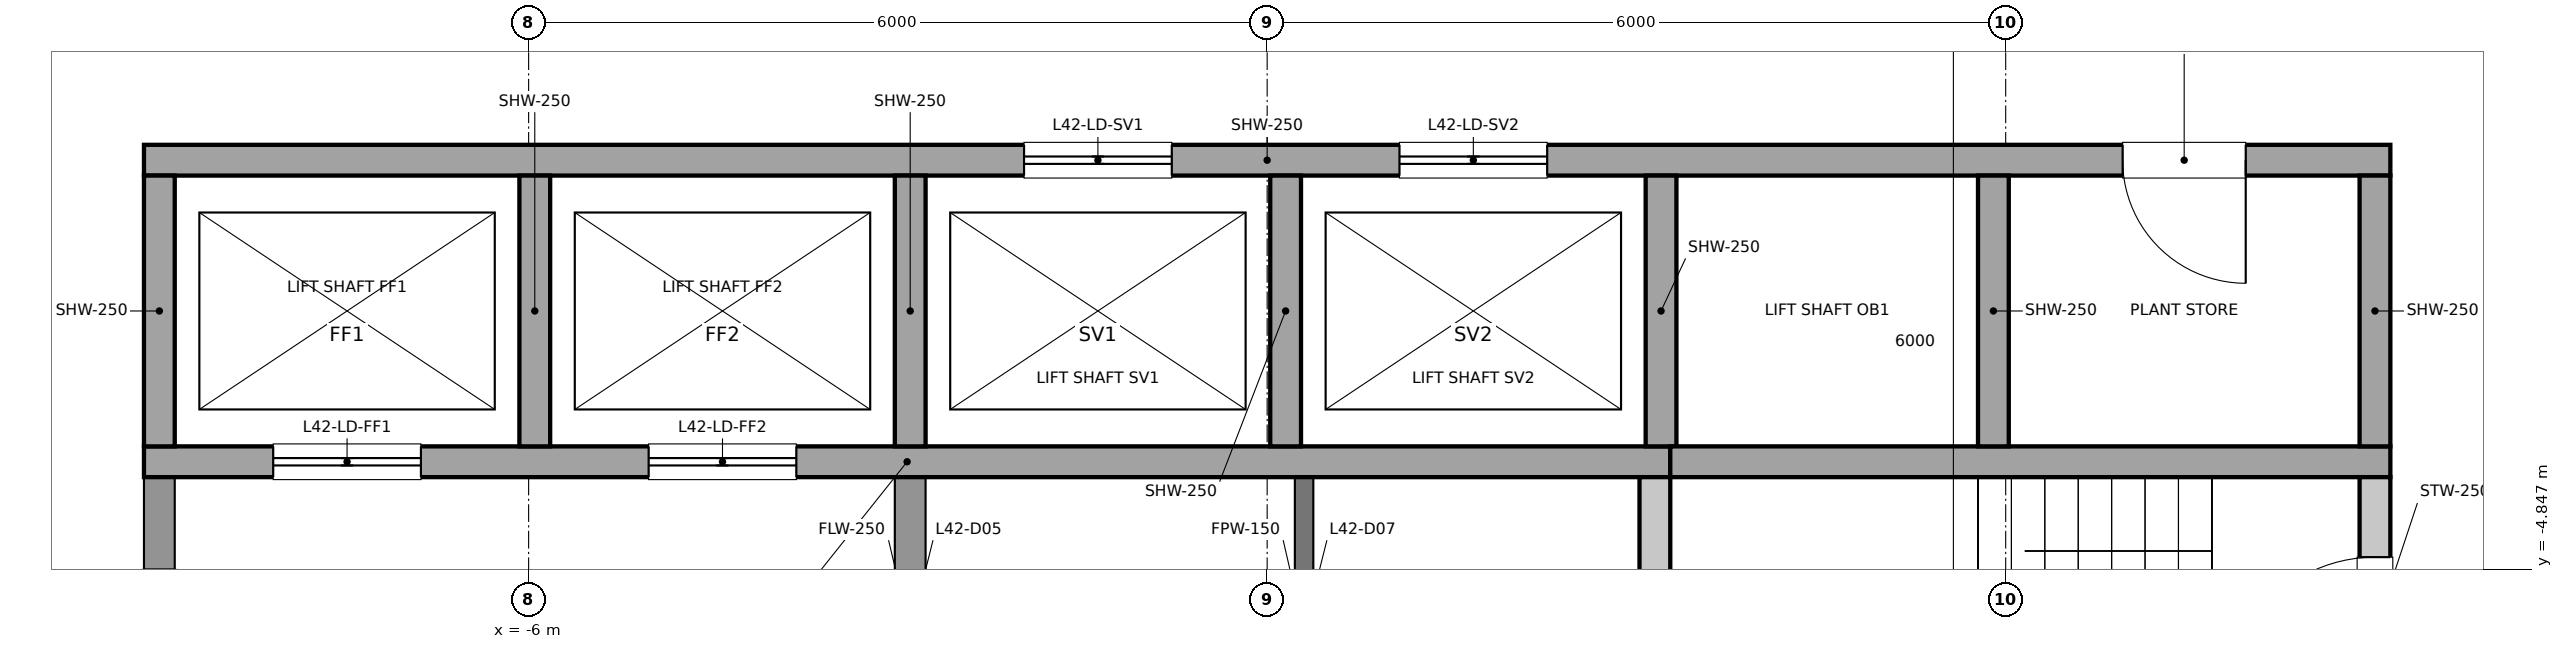
"""IFC4 building model, lengths in metres.
Left out: names, types, materials, properties, quantities, classifications, styles, units other than length and angle.
Written with IfcOpenShell. Run it as: python <this file> out.ifc"""

import sys

from ifc_helpers import new_model, si_unit, direction, frame, frame_2d, origin, place, context, subcontext, project, spatial, rectangle, extrude, element, fill, save


model = new_model("IFC4")
c1 = context("Model", 3, precision=1e-05, world=origin(), true_north=direction((0.0, 1.0)))
c2 = subcontext(c1, "Body", "Model", "MODEL_VIEW")
j1 = project(units=[si_unit("LENGTHUNIT", "METRE"), si_unit("PLANEANGLEUNIT", "RADIAN")], contexts=[c1])
p1 = place(None, origin())
s1 = spatial("IfcSite", under=j1, at=p1, CompositionType="ELEMENT")
p2 = place(p1, origin())
s2 = spatial("IfcBuilding", under=s1, at=p2, CompositionType="ELEMENT")
p3 = place(p2, frame((0.0, 0.0, 197.6)))
s3 = spatial("IfcBuildingStorey", under=s2, at=p3, CompositionType="ELEMENT", Elevation=197.6)
p4 = place(p3, frame((0.3, -6.6, 0.0), z_axis=(0.0, 0.0, 1.0), x_axis=(0.0, 1.0, 0.0)))
e1 = element("IfcWall", 1, at=p4, inside=s3, PredefinedType="PARTITIONING", context=c2, shape_type="SweptSolid", body=[
    extrude(rectangle(XDim=2.5, YDim=0.15, at=frame_2d((1.25, 0.0))), origin(), (0.0, 0.0, 1.0), 5.2),
])
p5 = place(p4, frame((0.8, 0.0, 0.0)))
e2 = element("IfcOpeningElement", 2, at=p5, cuts=e1, PredefinedType="OPENING", context=c2, shape_type="SweptSolid", body=[
    extrude(rectangle(XDim=0.9, YDim=2.1, at=frame_2d((0.45, 1.05))), frame((0.0, 0.075, 0.0), z_axis=(0.0, -1.0, 0.0), x_axis=(1.0, 0.0, 0.0)), (0.0, 0.0, 1.0), 0.15),
])
p6 = place(p3, frame((9.0, -6.6, 0.0), z_axis=(0.0, 0.0, 1.0), x_axis=(0.0, 1.0, 0.0)))
e3 = element("IfcWall", 3, at=p6, inside=s3, PredefinedType="SOLIDWALL", context=c2, shape_type="SweptSolid", body=[
    extrude(rectangle(XDim=2.5, YDim=0.25, at=frame_2d((1.25, 0.0))), origin(), (0.0, 0.0, 1.0), 5.2),
])
p7 = place(p6, frame((0.65, 0.0, 0.0)))
e4 = element("IfcOpeningElement", 4, at=p7, cuts=e3, PredefinedType="OPENING", context=c2, shape_type="SweptSolid", body=[
    extrude(rectangle(XDim=1.2, YDim=2.1, at=frame_2d((0.6, 1.05))), frame((0.0, 0.125, 0.0), z_axis=(0.0, -1.0, 0.0), x_axis=(1.0, 0.0, 0.0)), (0.0, 0.0, 1.0), 0.25),
])
p8 = place(p3, frame((-9.0, -6.6, 0.0), z_axis=(0.0, 0.0, 1.0), x_axis=(0.0, 1.0, 0.0)))
e5 = element("IfcWall", 5, at=p8, inside=s3, PredefinedType="PARTITIONING", context=c2, shape_type="SweptSolid", body=[
    extrude(rectangle(XDim=2.5, YDim=0.25, at=frame_2d((1.25, 0.0))), origin(), (0.0, 0.0, 1.0), 5.2),
])
p9 = place(p8, frame((0.75, 0.0, 0.0)))
e6 = element("IfcOpeningElement", 6, at=p9, cuts=e5, PredefinedType="OPENING", context=c2, shape_type="SweptSolid", body=[
    extrude(rectangle(XDim=1.0, YDim=2.1, at=frame_2d((0.5, 1.05))), frame((0.0, 0.125, 0.0), z_axis=(0.0, -1.0, 0.0), x_axis=(1.0, 0.0, 0.0)), (0.0, 0.0, 1.0), 0.25),
])
p10 = place(p3, frame((3.15, -6.6, 0.0), z_axis=(0.0, 0.0, 1.0), x_axis=(0.0, 1.0, 0.0)))
e7 = element("IfcWall", 7, at=p10, inside=s3, PredefinedType="SOLIDWALL", context=c2, shape_type="SweptSolid", body=[
    extrude(rectangle(XDim=2.5, YDim=0.25, at=frame_2d((1.25, 0.0))), origin(), (0.0, 0.0, 1.0), 5.2),
])
p11 = place(p3, frame((-2.9, -6.6, 0.0), z_axis=(0.0, 0.0, 1.0), x_axis=(0.0, 1.0, 0.0)))
e8 = element("IfcWall", 8, at=p11, inside=s3, PredefinedType="PARTITIONING", context=c2, shape_type="SweptSolid", body=[
    extrude(rectangle(XDim=2.5, YDim=0.25, at=frame_2d((1.25, 0.0))), origin(), (0.0, 0.0, 1.0), 5.2),
])
p12 = place(p11, frame((0.8, 0.0, 0.0)))
e9 = element("IfcOpeningElement", 9, at=p12, cuts=e8, PredefinedType="OPENING", context=c2, shape_type="SweptSolid", body=[
    extrude(rectangle(XDim=0.9, YDim=2.1, at=frame_2d((0.45, 1.05))), frame((0.0, 0.125, 0.0), z_axis=(0.0, -1.0, 0.0), x_axis=(1.0, 0.0, 0.0)), (0.0, 0.0, 1.0), 0.25),
])
p13 = place(p3, frame((-9.125, -1.525, 0.0), z_axis=(0.0, 0.0, 1.0), x_axis=(1.0, 0.0, 0.0)))
e10 = element("IfcWall", 10, at=p13, inside=s3, PredefinedType="SOLIDWALL", context=c2, shape_type="SweptSolid", body=[
    extrude(rectangle(XDim=18.25, YDim=0.25, at=frame_2d((9.125, 0.0))), origin(), (0.0, 0.0, 1.0), 5.2),
])
p14 = place(p13, frame((7.15, 0.0, 0.0)))
e11 = element("IfcOpeningElement", 11, at=p14, cuts=e10, PredefinedType="OPENING", context=c2, shape_type="SweptSolid", body=[
    extrude(rectangle(XDim=1.2, YDim=2.1, at=frame_2d((0.6, 1.05))), frame((0.0, 0.125, 0.0), z_axis=(0.0, -1.0, 0.0), x_axis=(1.0, 0.0, 0.0)), (0.0, 0.0, 1.0), 0.25),
])
p15 = place(p13, frame((10.2, 0.0, 0.0)))
e12 = element("IfcOpeningElement", 12, at=p15, cuts=e10, PredefinedType="OPENING", context=c2, shape_type="SweptSolid", body=[
    extrude(rectangle(XDim=1.2, YDim=2.1, at=frame_2d((0.6, 1.05))), frame((0.0, 0.125, 0.0), z_axis=(0.0, -1.0, 0.0), x_axis=(1.0, 0.0, 0.0)), (0.0, 0.0, 1.0), 0.25),
])
p16 = place(p13, frame((16.075, 0.0, 0.0)))
e13 = element("IfcOpeningElement", 13, at=p16, cuts=e10, PredefinedType="OPENING", context=c2, shape_type="SweptSolid", body=[
    extrude(rectangle(XDim=1.0, YDim=2.1, at=frame_2d((0.5, 1.05))), frame((0.0, 0.125, 0.0), z_axis=(0.0, -1.0, 0.0), x_axis=(1.0, 0.0, 0.0)), (0.0, 0.0, 1.0), 0.25),
])
p17 = place(p3, frame((-9.125, -3.975, 0.0), z_axis=(0.0, 0.0, 1.0), x_axis=(1.0, 0.0, 0.0)))
e14 = element("IfcWall", 14, at=p17, inside=s3, PredefinedType="SOLIDWALL", context=c2, shape_type="SweptSolid", body=[
    extrude(rectangle(XDim=12.4, YDim=0.25, at=frame_2d((6.2, 0.0))), origin(), (0.0, 0.0, 1.0), 5.2),
])
p18 = place(p17, frame((1.05, 0.0, 0.0)))
e15 = element("IfcOpeningElement", 15, at=p18, cuts=e14, PredefinedType="OPENING", context=c2, shape_type="SweptSolid", body=[
    extrude(rectangle(XDim=1.2, YDim=2.1, at=frame_2d((0.6, 1.05))), frame((0.0, 0.125, 0.0), z_axis=(0.0, -1.0, 0.0), x_axis=(1.0, 0.0, 0.0)), (0.0, 0.0, 1.0), 0.25),
])
p19 = place(p17, frame((4.1, 0.0, 0.0)))
e16 = element("IfcOpeningElement", 16, at=p19, cuts=e14, PredefinedType="OPENING", context=c2, shape_type="SweptSolid", body=[
    extrude(rectangle(XDim=1.2, YDim=2.1, at=frame_2d((0.6, 1.05))), frame((0.0, 0.125, 0.0), z_axis=(0.0, -1.0, 0.0), x_axis=(1.0, 0.0, 0.0)), (0.0, 0.0, 1.0), 0.25),
])
p20 = place(p3, frame((3.275, -3.975, 0.0), z_axis=(0.0, 0.0, 1.0), x_axis=(1.0, 0.0, 0.0)))
e17 = element("IfcWall", 17, at=p20, inside=s3, PredefinedType="SOLIDWALL", context=c2, shape_type="SweptSolid", body=[
    extrude(rectangle(XDim=5.85, YDim=0.25, at=frame_2d((2.925, 0.0))), origin(), (0.0, 0.0, 1.0), 5.2),
])
for number, where, z_axis, x_axis in (
    (18, (-9.0, -3.85, 0.0), (0.0, 0.0, 1.0), (0.0, 1.0, 0.0)),
    (19, (-5.95, -3.85, 0.0), (0.0, 0.0, 1.0), (0.0, 1.0, 0.0)),
    (20, (-2.9, -3.85, 0.0), (0.0, 0.0, 1.0), (0.0, 1.0, 0.0)),
    (21, (0.15, -3.85, 0.0), (0.0, 0.0, 1.0), (0.0, 1.0, 0.0)),
    (22, (3.2, -3.85, 0.0), (0.0, 0.0, 1.0), (0.0, 1.0, 0.0)),
    (23, (5.9, -3.85, 0.0), (0.0, 0.0, 1.0), (0.0, 1.0, 0.0)),
    (24, (9.0, -3.85, 0.0), (0.0, 0.0, 1.0), (0.0, 1.0, 0.0)),
):
    element("IfcWall", number, at=place(p3, frame(where, z_axis=z_axis, x_axis=x_axis)), inside=s3, PredefinedType="SOLIDWALL", context=c2, shape_type="SweptSolid", body=[
        extrude(rectangle(XDim=2.2, YDim=0.25, at=frame_2d((1.1, 0.0))), origin(), (0.0, 0.0, 1.0), 5.2),
    ])
p21 = place(p18, origin())
e25 = element("IfcDoor", 25, at=p21, inside=s3, OperationType="DOUBLE_DOOR_SLIDING", PredefinedType="DOOR", context=c2, shape_type="SweptSolid", body=[
    extrude(rectangle(XDim=1.2, YDim=2.1, at=frame_2d((0.6, 1.05))), frame((0.0, 0.025, 0.0), z_axis=(0.0, -1.0, 0.0), x_axis=(1.0, 0.0, 0.0)), (0.0, 0.0, 1.0), 0.05),
])
fill(e15, e25)
p22 = place(p19, origin())
e26 = element("IfcDoor", 26, at=p22, inside=s3, OperationType="DOUBLE_DOOR_SLIDING", PredefinedType="DOOR", context=c2, shape_type="SweptSolid", body=[
    extrude(rectangle(XDim=1.2, YDim=2.1, at=frame_2d((0.6, 1.05))), frame((0.0, 0.025, 0.0), z_axis=(0.0, -1.0, 0.0), x_axis=(1.0, 0.0, 0.0)), (0.0, 0.0, 1.0), 0.05),
])
fill(e16, e26)
p23 = place(p14, origin())
e27 = element("IfcDoor", 27, at=p23, inside=s3, OperationType="DOUBLE_DOOR_SLIDING", PredefinedType="DOOR", context=c2, shape_type="SweptSolid", body=[
    extrude(rectangle(XDim=1.2, YDim=2.1, at=frame_2d((0.6, 1.05))), frame((0.0, 0.025, 0.0), z_axis=(0.0, -1.0, 0.0), x_axis=(1.0, 0.0, 0.0)), (0.0, 0.0, 1.0), 0.05),
])
fill(e11, e27)
p24 = place(p15, origin())
e28 = element("IfcDoor", 28, at=p24, inside=s3, OperationType="DOUBLE_DOOR_SLIDING", PredefinedType="DOOR", context=c2, shape_type="SweptSolid", body=[
    extrude(rectangle(XDim=1.2, YDim=2.1, at=frame_2d((0.6, 1.05))), frame((0.0, 0.025, 0.0), z_axis=(0.0, -1.0, 0.0), x_axis=(1.0, 0.0, 0.0)), (0.0, 0.0, 1.0), 0.05),
])
fill(e12, e28)
p25 = place(p7, origin())
e29 = element("IfcDoor", 29, at=p25, inside=s3, OperationType="SINGLE_SWING_LEFT", PredefinedType="DOOR", context=c2, shape_type="SweptSolid", body=[
    extrude(rectangle(XDim=1.2, YDim=2.1, at=frame_2d((0.6, 1.05))), frame((0.0, 0.025, 0.0), z_axis=(0.0, -1.0, 0.0), x_axis=(1.0, 0.0, 0.0)), (0.0, 0.0, 1.0), 0.05),
])
fill(e4, e29)
p26 = place(p16, origin())
e30 = element("IfcDoor", 30, at=p26, inside=s3, OperationType="SINGLE_SWING_RIGHT", PredefinedType="DOOR", context=c2, shape_type="SweptSolid", body=[
    extrude(rectangle(XDim=1.0, YDim=2.1, at=frame_2d((0.5, 1.05))), frame((0.0, 0.025, 0.0), z_axis=(0.0, -1.0, 0.0), x_axis=(1.0, 0.0, 0.0)), (0.0, 0.0, 1.0), 0.05),
])
fill(e13, e30)
save(model, sys.argv[1])
